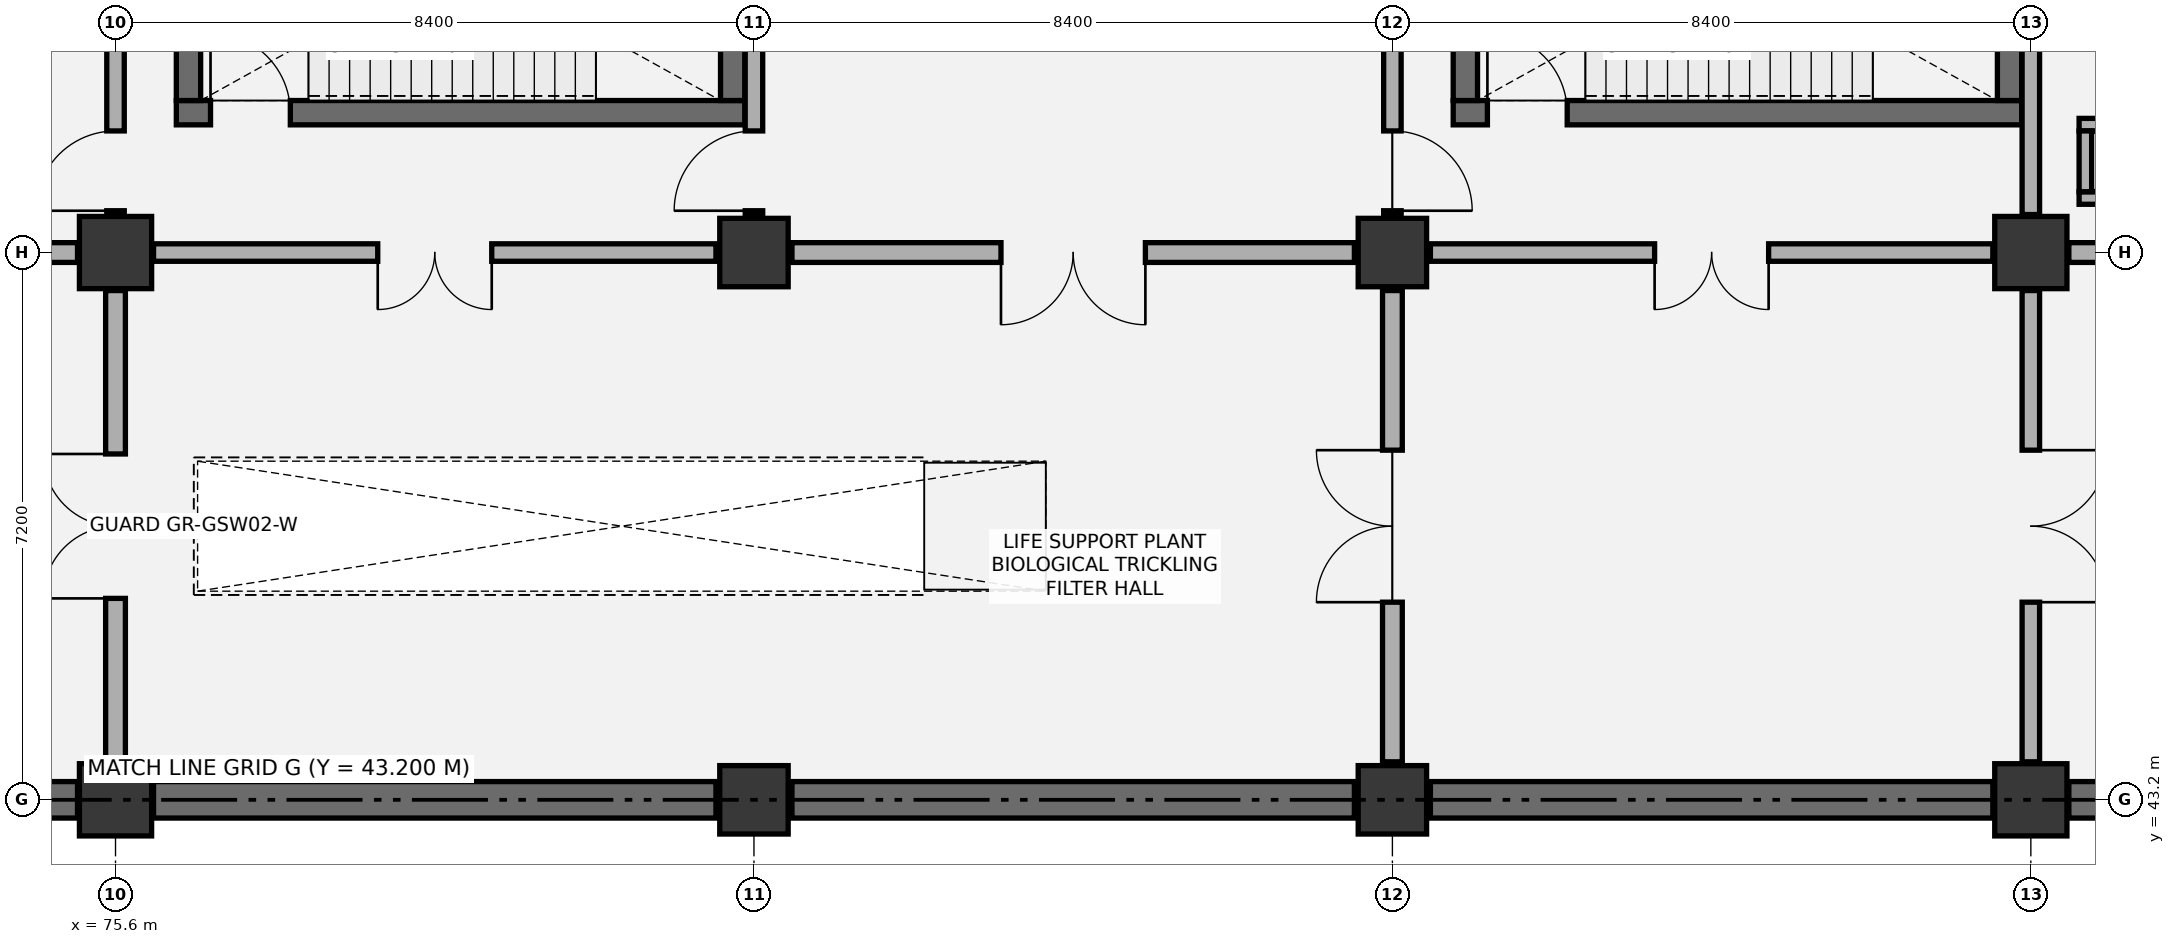
"""IFC4 building model, lengths in metres.
Left out: names, types, materials, properties, quantities, classifications, styles, units other than length and angle.
Written with IfcOpenShell. Run it as: python <this file> out.ifc"""

import sys

from ifc_helpers import new_model, si_unit, direction, frame, frame_2d, origin, origin_2d, place, context, subcontext, project, spatial, rectangle, extrude, element, fill, save


model = new_model("IFC4")
c1 = context("Model", 3, precision=1e-05, world=origin(), true_north=direction((0.0, 1.0)))
c2 = subcontext(c1, "Body", "Model", "MODEL_VIEW")
j1 = project(units=[si_unit("LENGTHUNIT", "METRE"), si_unit("PLANEANGLEUNIT", "RADIAN")], contexts=[c1])
p1 = place(None, origin())
s1 = spatial("IfcSite", under=j1, at=p1, CompositionType="ELEMENT")
p2 = place(p1, origin())
s2 = spatial("IfcBuilding", under=s1, at=p2, CompositionType="ELEMENT")
p3 = place(p2, frame((0.0, 0.0, -4.8)))
s3 = spatial("IfcBuildingStorey", under=s2, at=p3, CompositionType="ELEMENT", Elevation=-4.8)
for number, where, z_axis, x_axis in (
    (1, (75.6, 43.2, 0.0), (0.0, 0.0, 1.0), (1.0, 0.0, 0.0)),
    (2, (75.6, 50.4, 0.0), (0.0, 0.0, 1.0), (1.0, 0.0, 0.0)),
):
    element("IfcColumn", number, at=place(p3, frame(where, z_axis=z_axis, x_axis=x_axis)), inside=s3, PredefinedType="COLUMN", context=c2, shape_type="SweptSolid", body=[
        extrude(rectangle(XDim=0.95, YDim=0.95, at=origin_2d()), origin(), (0.0, 0.0, 1.0), 4.8),
    ])
for number, where, z_axis, x_axis in (
    (3, (84.0, 43.2, 0.0), (0.0, 0.0, 1.0), (1.0, 0.0, 0.0)),
    (4, (84.0, 50.4, 0.0), (0.0, 0.0, 1.0), (1.0, 0.0, 0.0)),
    (5, (92.4, 43.2, 0.0), (0.0, 0.0, 1.0), (1.0, 0.0, 0.0)),
    (6, (92.4, 50.4, 0.0), (0.0, 0.0, 1.0), (1.0, 0.0, 0.0)),
):
    element("IfcColumn", number, at=place(p3, frame(where, z_axis=z_axis, x_axis=x_axis)), inside=s3, PredefinedType="COLUMN", context=c2, shape_type="SweptSolid", body=[
        extrude(rectangle(XDim=0.9, YDim=0.9, at=origin_2d()), origin(), (0.0, 0.0, 1.0), 4.8),
    ])
for number, where, z_axis, x_axis in (
    (7, (100.8, 43.2, 0.0), (0.0, 0.0, 1.0), (1.0, 0.0, 0.0)),
    (8, (100.8, 50.4, 0.0), (0.0, 0.0, 1.0), (1.0, 0.0, 0.0)),
):
    element("IfcColumn", number, at=place(p3, frame(where, z_axis=z_axis, x_axis=x_axis)), inside=s3, PredefinedType="COLUMN", context=c2, shape_type="SweptSolid", body=[
        extrude(rectangle(XDim=0.95, YDim=0.95, at=origin_2d()), origin(), (0.0, 0.0, 1.0), 4.8),
    ])
p4 = place(p3, frame((67.7, 43.2, 0.0), z_axis=(0.0, 0.0, 1.0), x_axis=(1.0, 0.0, 0.0)))
e9 = element("IfcWall", 9, at=p4, inside=s3, PredefinedType="USERDEFINED", context=c2, shape_type="SweptSolid", body=[
    extrude(rectangle(XDim=7.4, YDim=0.48, at=frame_2d((3.7, 0.0))), origin(), (0.0, 0.0, 1.0), 4.45),
])
for number, where, z_axis, x_axis in (
    (10, (76.1, 43.2, 0.0), (0.0, 0.0, 1.0), (1.0, 0.0, 0.0)),
    (11, (84.5, 43.2, 0.0), (0.0, 0.0, 1.0), (1.0, 0.0, 0.0)),
):
    element("IfcWall", number, at=place(p3, frame(where, z_axis=z_axis, x_axis=x_axis)), inside=s3, PredefinedType="USERDEFINED", context=c2, shape_type="SweptSolid", body=[
        extrude(rectangle(XDim=7.4, YDim=0.48, at=frame_2d((3.7, 0.0))), origin(), (0.0, 0.0, 1.0), 4.45),
    ])
p5 = place(p3, frame((92.9, 43.2, 0.0), z_axis=(0.0, 0.0, 1.0), x_axis=(1.0, 0.0, 0.0)))
e12 = element("IfcWall", 12, at=p5, inside=s3, PredefinedType="USERDEFINED", context=c2, shape_type="SweptSolid", body=[
    extrude(rectangle(XDim=7.4, YDim=0.48, at=frame_2d((3.7, 0.0))), origin(), (0.0, 0.0, 1.0), 4.45),
])
p6 = place(p3, frame((101.3, 43.2, 0.0), z_axis=(0.0, 0.0, 1.0), x_axis=(1.0, 0.0, 0.0)))
e13 = element("IfcWall", 13, at=p6, inside=s3, PredefinedType="USERDEFINED", context=c2, shape_type="SweptSolid", body=[
    extrude(rectangle(XDim=7.4, YDim=0.48, at=frame_2d((3.7, 0.0))), origin(), (0.0, 0.0, 1.0), 4.45),
])
p7 = place(p3, frame((76.4, 52.24, 0.0), z_axis=(0.0, 0.0, 1.0), x_axis=(1.0, 0.0, 0.0)))
e14 = element("IfcWall", 14, at=p7, inside=s3, PredefinedType="SHEAR", context=c2, shape_type="SweptSolid", body=[
    extrude(rectangle(XDim=7.48, YDim=0.32, at=frame_2d((3.74, 0.0))), origin(), (0.0, 0.0, 1.0), 4.45),
])
p8 = place(p7, frame((0.45, 0.0, 0.0)))
e15 = element("IfcOpeningElement", 15, at=p8, cuts=e14, PredefinedType="OPENING", context=c2, shape_type="SweptSolid", body=[
    extrude(rectangle(XDim=1.05, YDim=2.15, at=frame_2d((0.525, 1.075))), frame((0.0, 0.17, 0.0), z_axis=(0.0, -1.0, 0.0), x_axis=(1.0, 0.0, 0.0)), (0.0, 0.0, 1.0), 0.34),
])
for number, where, z_axis, x_axis in (
    (16, (76.56, 52.4, 0.0), (0.0, 0.0, 1.0), (0.0, 1.0, 0.0)),
    (17, (83.72, 52.4, 0.0), (0.0, 0.0, 1.0), (0.0, 1.0, 0.0)),
):
    element("IfcWall", number, at=place(p3, frame(where, z_axis=z_axis, x_axis=x_axis)), inside=s3, PredefinedType="SHEAR", context=c2, shape_type="SweptSolid", body=[
        extrude(rectangle(XDim=3.8, YDim=0.32, at=frame_2d((1.9, 0.0))), origin(), (0.0, 0.0, 1.0), 4.45),
    ])
p9 = place(p3, frame((93.2, 52.24, 0.0), z_axis=(0.0, 0.0, 1.0), x_axis=(1.0, 0.0, 0.0)))
e18 = element("IfcWall", 18, at=p9, inside=s3, PredefinedType="SHEAR", context=c2, shape_type="SweptSolid", body=[
    extrude(rectangle(XDim=7.48, YDim=0.32, at=frame_2d((3.74, 0.0))), origin(), (0.0, 0.0, 1.0), 4.45),
])
p10 = place(p9, frame((0.45, 0.0, 0.0)))
e19 = element("IfcOpeningElement", 19, at=p10, cuts=e18, PredefinedType="OPENING", context=c2, shape_type="SweptSolid", body=[
    extrude(rectangle(XDim=1.05, YDim=2.15, at=frame_2d((0.525, 1.075))), frame((0.0, 0.17, 0.0), z_axis=(0.0, -1.0, 0.0), x_axis=(1.0, 0.0, 0.0)), (0.0, 0.0, 1.0), 0.34),
])
for number, where, z_axis, x_axis in (
    (20, (93.36, 52.4, 0.0), (0.0, 0.0, 1.0), (0.0, 1.0, 0.0)),
    (21, (100.52, 52.4, 0.0), (0.0, 0.0, 1.0), (0.0, 1.0, 0.0)),
):
    element("IfcWall", number, at=place(p3, frame(where, z_axis=z_axis, x_axis=x_axis)), inside=s3, PredefinedType="SHEAR", context=c2, shape_type="SweptSolid", body=[
        extrude(rectangle(XDim=3.8, YDim=0.32, at=frame_2d((1.9, 0.0))), origin(), (0.0, 0.0, 1.0), 4.45),
    ])
for number, where, z_axis, x_axis in (
    (22, (101.435, 51.117, 0.0), (0.0, 0.0, 1.0), (1.0, 0.0, 0.0)),
    (23, (101.435, 52.083, 0.0), (0.0, 0.0, 1.0), (1.0, 0.0, 0.0)),
):
    element("IfcWall", number, at=place(p3, frame(where, z_axis=z_axis, x_axis=x_axis)), inside=s3, PredefinedType="PARTITIONING", context=c2, shape_type="SweptSolid", body=[
        extrude(rectangle(XDim=1.43, YDim=0.165, at=frame_2d((0.715, 0.0))), origin(), (0.0, 0.0, 1.0), 4.45),
    ])
p11 = place(p3, frame((101.518, 51.2, 0.0), z_axis=(0.0, 0.0, 1.0), x_axis=(0.0, 1.0, 0.0)))
e24 = element("IfcWall", 24, at=p11, inside=s3, PredefinedType="PARTITIONING", context=c2, shape_type="SweptSolid", body=[
    extrude(rectangle(XDim=0.8, YDim=0.165, at=frame_2d((0.4, 0.0))), origin(), (0.0, 0.0, 1.0), 4.45),
])
p12 = place(p3, frame((75.6, 43.7, 0.0), z_axis=(0.0, 0.0, 1.0), x_axis=(0.0, 1.0, 0.0)))
e25 = element("IfcWall", 25, at=p12, inside=s3, PredefinedType="PARTITIONING", context=c2, shape_type="SweptSolid", body=[
    extrude(rectangle(XDim=6.2, YDim=0.26, at=frame_2d((3.1, 0.0))), origin(), (0.0, 0.0, 1.0), 3.645),
])
p13 = place(p12, frame((2.15, 0.0, 0.0)))
e26 = element("IfcOpeningElement", 26, at=p13, cuts=e25, PredefinedType="OPENING", context=c2, shape_type="SweptSolid", body=[
    extrude(rectangle(XDim=1.9, YDim=2.3, at=frame_2d((0.95, 1.15))), frame((0.0, 0.14, 0.0), z_axis=(0.0, -1.0, 0.0), x_axis=(1.0, 0.0, 0.0)), (0.0, 0.0, 1.0), 0.28),
])
p14 = place(p3, frame((67.7, 50.4, 0.0), z_axis=(0.0, 0.0, 1.0), x_axis=(1.0, 0.0, 0.0)))
e27 = element("IfcWall", 27, at=p14, inside=s3, PredefinedType="PARTITIONING", context=c2, shape_type="SweptSolid", body=[
    extrude(rectangle(XDim=7.4, YDim=0.26, at=frame_2d((3.7, 0.0))), origin(), (0.0, 0.0, 1.0), 3.545),
])
p15 = place(p3, frame((75.6, 50.9, 0.0), z_axis=(0.0, 0.0, 1.0), x_axis=(0.0, 1.0, 0.0)))
e28 = element("IfcWall", 28, at=p15, inside=s3, PredefinedType="PARTITIONING", context=c2, shape_type="SweptSolid", body=[
    extrude(rectangle(XDim=6.2, YDim=0.23, at=frame_2d((3.1, 0.0))), origin(), (0.0, 0.0, 1.0), 3.645),
])
p16 = place(p15, frame((0.05, 0.0, 0.0)))
e29 = element("IfcOpeningElement", 29, at=p16, cuts=e28, PredefinedType="OPENING", context=c2, shape_type="SweptSolid", body=[
    extrude(rectangle(XDim=1.05, YDim=2.15, at=frame_2d((0.525, 1.075))), frame((0.0, 0.125, 0.0), z_axis=(0.0, -1.0, 0.0), x_axis=(1.0, 0.0, 0.0)), (0.0, 0.0, 1.0), 0.25),
])
p17 = place(p3, frame((76.1, 50.4, 0.0), z_axis=(0.0, 0.0, 1.0), x_axis=(1.0, 0.0, 0.0)))
e30 = element("IfcWall", 30, at=p17, inside=s3, PredefinedType="PARTITIONING", context=c2, shape_type="SweptSolid", body=[
    extrude(rectangle(XDim=7.4, YDim=0.23, at=frame_2d((3.7, 0.0))), origin(), (0.0, 0.0, 1.0), 3.545),
])
p18 = place(p17, frame((2.95, 0.0, 0.0)))
e31 = element("IfcOpeningElement", 31, at=p18, cuts=e30, PredefinedType="OPENING", context=c2, shape_type="SweptSolid", body=[
    extrude(rectangle(XDim=1.5, YDim=2.15, at=frame_2d((0.75, 1.075))), frame((0.0, 0.125, 0.0), z_axis=(0.0, -1.0, 0.0), x_axis=(1.0, 0.0, 0.0)), (0.0, 0.0, 1.0), 0.25),
])
p19 = place(p3, frame((84.0, 50.9, 0.0), z_axis=(0.0, 0.0, 1.0), x_axis=(0.0, 1.0, 0.0)))
e32 = element("IfcWall", 32, at=p19, inside=s3, PredefinedType="PARTITIONING", context=c2, shape_type="SweptSolid", body=[
    extrude(rectangle(XDim=6.2, YDim=0.23, at=frame_2d((3.1, 0.0))), origin(), (0.0, 0.0, 1.0), 3.645),
])
p20 = place(p19, frame((0.05, 0.0, 0.0)))
e33 = element("IfcOpeningElement", 33, at=p20, cuts=e32, PredefinedType="OPENING", context=c2, shape_type="SweptSolid", body=[
    extrude(rectangle(XDim=1.05, YDim=2.15, at=frame_2d((0.525, 1.075))), frame((0.0, 0.125, 0.0), z_axis=(0.0, -1.0, 0.0), x_axis=(1.0, 0.0, 0.0)), (0.0, 0.0, 1.0), 0.25),
])
p21 = place(p3, frame((92.4, 43.7, 0.0), z_axis=(0.0, 0.0, 1.0), x_axis=(0.0, 1.0, 0.0)))
e34 = element("IfcWall", 34, at=p21, inside=s3, PredefinedType="PARTITIONING", context=c2, shape_type="SweptSolid", body=[
    extrude(rectangle(XDim=6.2, YDim=0.26, at=frame_2d((3.1, 0.0))), origin(), (0.0, 0.0, 1.0), 3.645),
])
p22 = place(p21, frame((2.1, 0.0, 0.0)))
e35 = element("IfcOpeningElement", 35, at=p22, cuts=e34, PredefinedType="OPENING", context=c2, shape_type="SweptSolid", body=[
    extrude(rectangle(XDim=2.0, YDim=2.35, at=frame_2d((1.0, 1.175))), frame((0.0, 0.14, 0.0), z_axis=(0.0, -1.0, 0.0), x_axis=(1.0, 0.0, 0.0)), (0.0, 0.0, 1.0), 0.28),
])
p23 = place(p3, frame((84.5, 50.4, 0.0), z_axis=(0.0, 0.0, 1.0), x_axis=(1.0, 0.0, 0.0)))
e36 = element("IfcWall", 36, at=p23, inside=s3, PredefinedType="PARTITIONING", context=c2, shape_type="SweptSolid", body=[
    extrude(rectangle(XDim=7.4, YDim=0.26, at=frame_2d((3.7, 0.0))), origin(), (0.0, 0.0, 1.0), 3.545),
])
p24 = place(p23, frame((2.75, 0.0, 0.0)))
e37 = element("IfcOpeningElement", 37, at=p24, cuts=e36, PredefinedType="OPENING", context=c2, shape_type="SweptSolid", body=[
    extrude(rectangle(XDim=1.9, YDim=2.3, at=frame_2d((0.95, 1.15))), frame((0.0, 0.14, 0.0), z_axis=(0.0, -1.0, 0.0), x_axis=(1.0, 0.0, 0.0)), (0.0, 0.0, 1.0), 0.28),
])
p25 = place(p3, frame((92.4, 50.9, 0.0), z_axis=(0.0, 0.0, 1.0), x_axis=(0.0, 1.0, 0.0)))
e38 = element("IfcWall", 38, at=p25, inside=s3, PredefinedType="PARTITIONING", context=c2, shape_type="SweptSolid", body=[
    extrude(rectangle(XDim=6.2, YDim=0.23, at=frame_2d((3.1, 0.0))), origin(), (0.0, 0.0, 1.0), 3.645),
])
p26 = place(p25, frame((0.05, 0.0, 0.0)))
e39 = element("IfcOpeningElement", 39, at=p26, cuts=e38, PredefinedType="OPENING", context=c2, shape_type="SweptSolid", body=[
    extrude(rectangle(XDim=1.05, YDim=2.15, at=frame_2d((0.525, 1.075))), frame((0.0, 0.125, 0.0), z_axis=(0.0, -1.0, 0.0), x_axis=(1.0, 0.0, 0.0)), (0.0, 0.0, 1.0), 0.25),
])
p27 = place(p3, frame((100.8, 43.7, 0.0), z_axis=(0.0, 0.0, 1.0), x_axis=(0.0, 1.0, 0.0)))
e40 = element("IfcWall", 40, at=p27, inside=s3, PredefinedType="PARTITIONING", context=c2, shape_type="SweptSolid", body=[
    extrude(rectangle(XDim=6.2, YDim=0.23, at=frame_2d((3.1, 0.0))), origin(), (0.0, 0.0, 1.0), 3.645),
])
p28 = place(p27, frame((2.1, 0.0, 0.0)))
e41 = element("IfcOpeningElement", 41, at=p28, cuts=e40, PredefinedType="OPENING", context=c2, shape_type="SweptSolid", body=[
    extrude(rectangle(XDim=2.0, YDim=2.35, at=frame_2d((1.0, 1.175))), frame((0.0, 0.125, 0.0), z_axis=(0.0, -1.0, 0.0), x_axis=(1.0, 0.0, 0.0)), (0.0, 0.0, 1.0), 0.25),
])
p29 = place(p3, frame((92.9, 50.4, 0.0), z_axis=(0.0, 0.0, 1.0), x_axis=(1.0, 0.0, 0.0)))
e42 = element("IfcWall", 42, at=p29, inside=s3, PredefinedType="PARTITIONING", context=c2, shape_type="SweptSolid", body=[
    extrude(rectangle(XDim=7.4, YDim=0.23, at=frame_2d((3.7, 0.0))), origin(), (0.0, 0.0, 1.0), 3.545),
])
p30 = place(p29, frame((2.95, 0.0, 0.0)))
e43 = element("IfcOpeningElement", 43, at=p30, cuts=e42, PredefinedType="OPENING", context=c2, shape_type="SweptSolid", body=[
    extrude(rectangle(XDim=1.5, YDim=2.15, at=frame_2d((0.75, 1.075))), frame((0.0, 0.125, 0.0), z_axis=(0.0, -1.0, 0.0), x_axis=(1.0, 0.0, 0.0)), (0.0, 0.0, 1.0), 0.25),
])
p31 = place(p3, frame((100.8, 50.9, 0.0), z_axis=(0.0, 0.0, 1.0), x_axis=(0.0, 1.0, 0.0)))
e44 = element("IfcWall", 44, at=p31, inside=s3, PredefinedType="PARTITIONING", context=c2, shape_type="SweptSolid", body=[
    extrude(rectangle(XDim=6.2, YDim=0.23, at=frame_2d((3.1, 0.0))), origin(), (0.0, 0.0, 1.0), 3.645),
])
p32 = place(p3, frame((101.3, 50.4, 0.0), z_axis=(0.0, 0.0, 1.0), x_axis=(1.0, 0.0, 0.0)))
e45 = element("IfcWall", 45, at=p32, inside=s3, PredefinedType="PARTITIONING", context=c2, shape_type="SweptSolid", body=[
    extrude(rectangle(XDim=7.4, YDim=0.26, at=frame_2d((3.7, 0.0))), origin(), (0.0, 0.0, 1.0), 3.545),
])
p33 = place(p32, frame((2.75, 0.0, 0.0)))
e46 = element("IfcOpeningElement", 46, at=p33, cuts=e45, PredefinedType="OPENING", context=c2, shape_type="SweptSolid", body=[
    extrude(rectangle(XDim=1.9, YDim=2.3, at=frame_2d((0.95, 1.15))), frame((0.0, 0.14, 0.0), z_axis=(0.0, -1.0, 0.0), x_axis=(1.0, 0.0, 0.0)), (0.0, 0.0, 1.0), 0.28),
])
p34 = place(p8, origin())
e47 = element("IfcDoor", 47, at=p34, inside=s3, OperationType="SINGLE_SWING_LEFT", PredefinedType="DOOR", context=c2, shape_type="SweptSolid", body=[
    extrude(rectangle(XDim=1.05, YDim=2.15, at=frame_2d((0.525, 1.075))), frame((0.0, 0.025, 0.0), z_axis=(0.0, -1.0, 0.0), x_axis=(1.0, 0.0, 0.0)), (0.0, 0.0, 1.0), 0.05),
])
fill(e15, e47)
p35 = place(p10, origin())
e48 = element("IfcDoor", 48, at=p35, inside=s3, OperationType="SINGLE_SWING_LEFT", PredefinedType="DOOR", context=c2, shape_type="SweptSolid", body=[
    extrude(rectangle(XDim=1.05, YDim=2.15, at=frame_2d((0.525, 1.075))), frame((0.0, 0.025, 0.0), z_axis=(0.0, -1.0, 0.0), x_axis=(1.0, 0.0, 0.0)), (0.0, 0.0, 1.0), 0.05),
])
fill(e19, e48)
p36 = place(p13, origin())
e49 = element("IfcDoor", 49, at=p36, inside=s3, OperationType="DOUBLE_DOOR_SINGLE_SWING", PredefinedType="DOOR", context=c2, shape_type="SweptSolid", body=[
    extrude(rectangle(XDim=1.9, YDim=2.3, at=frame_2d((0.95, 1.15))), frame((0.0, 0.025, 0.0), z_axis=(0.0, -1.0, 0.0), x_axis=(1.0, 0.0, 0.0)), (0.0, 0.0, 1.0), 0.05),
])
fill(e26, e49)
p37 = place(p16, origin())
e50 = element("IfcDoor", 50, at=p37, inside=s3, OperationType="SINGLE_SWING_LEFT", PredefinedType="DOOR", context=c2, shape_type="SweptSolid", body=[
    extrude(rectangle(XDim=1.05, YDim=2.15, at=frame_2d((0.525, 1.075))), frame((0.0, 0.025, 0.0), z_axis=(0.0, -1.0, 0.0), x_axis=(1.0, 0.0, 0.0)), (0.0, 0.0, 1.0), 0.05),
])
fill(e29, e50)
p38 = place(p18, frame((1.5, 0.0, 0.0), z_axis=(0.0, 0.0, 1.0), x_axis=(-1.0, 0.0, 0.0)))
e51 = element("IfcDoor", 51, at=p38, inside=s3, OperationType="DOUBLE_DOOR_SINGLE_SWING", PredefinedType="DOOR", context=c2, shape_type="SweptSolid", body=[
    extrude(rectangle(XDim=1.5, YDim=2.15, at=frame_2d((0.75, 1.075))), frame((0.0, 0.025, 0.0), z_axis=(0.0, -1.0, 0.0), x_axis=(1.0, 0.0, 0.0)), (0.0, 0.0, 1.0), 0.05),
])
fill(e31, e51)
p39 = place(p20, origin())
e52 = element("IfcDoor", 52, at=p39, inside=s3, OperationType="SINGLE_SWING_LEFT", PredefinedType="DOOR", context=c2, shape_type="SweptSolid", body=[
    extrude(rectangle(XDim=1.05, YDim=2.15, at=frame_2d((0.525, 1.075))), frame((0.0, 0.025, 0.0), z_axis=(0.0, -1.0, 0.0), x_axis=(1.0, 0.0, 0.0)), (0.0, 0.0, 1.0), 0.05),
])
fill(e33, e52)
p40 = place(p22, origin())
e53 = element("IfcDoor", 53, at=p40, inside=s3, OperationType="DOUBLE_DOOR_SINGLE_SWING", PredefinedType="DOOR", context=c2, shape_type="SweptSolid", body=[
    extrude(rectangle(XDim=2.0, YDim=2.35, at=frame_2d((1.0, 1.175))), frame((0.0, 0.025, 0.0), z_axis=(0.0, -1.0, 0.0), x_axis=(1.0, 0.0, 0.0)), (0.0, 0.0, 1.0), 0.05),
])
fill(e35, e53)
p41 = place(p24, frame((1.9, 0.0, 0.0), z_axis=(0.0, 0.0, 1.0), x_axis=(-1.0, 0.0, 0.0)))
e54 = element("IfcDoor", 54, at=p41, inside=s3, OperationType="DOUBLE_DOOR_SINGLE_SWING", PredefinedType="DOOR", context=c2, shape_type="SweptSolid", body=[
    extrude(rectangle(XDim=1.9, YDim=2.3, at=frame_2d((0.95, 1.15))), frame((0.0, 0.025, 0.0), z_axis=(0.0, -1.0, 0.0), x_axis=(1.0, 0.0, 0.0)), (0.0, 0.0, 1.0), 0.05),
])
fill(e37, e54)
p42 = place(p26, frame((1.05, 0.0, 0.0), z_axis=(0.0, 0.0, 1.0), x_axis=(-1.0, 0.0, 0.0)))
e55 = element("IfcDoor", 55, at=p42, inside=s3, OperationType="SINGLE_SWING_RIGHT", PredefinedType="DOOR", context=c2, shape_type="SweptSolid", body=[
    extrude(rectangle(XDim=1.05, YDim=2.15, at=frame_2d((0.525, 1.075))), frame((0.0, 0.025, 0.0), z_axis=(0.0, -1.0, 0.0), x_axis=(1.0, 0.0, 0.0)), (0.0, 0.0, 1.0), 0.05),
])
fill(e39, e55)
p43 = place(p28, frame((2.0, 0.0, 0.0), z_axis=(0.0, 0.0, 1.0), x_axis=(-1.0, 0.0, 0.0)))
e56 = element("IfcDoor", 56, at=p43, inside=s3, OperationType="DOUBLE_DOOR_SINGLE_SWING", PredefinedType="DOOR", context=c2, shape_type="SweptSolid", body=[
    extrude(rectangle(XDim=2.0, YDim=2.35, at=frame_2d((1.0, 1.175))), frame((0.0, 0.025, 0.0), z_axis=(0.0, -1.0, 0.0), x_axis=(1.0, 0.0, 0.0)), (0.0, 0.0, 1.0), 0.05),
])
fill(e41, e56)
p44 = place(p30, frame((1.5, 0.0, 0.0), z_axis=(0.0, 0.0, 1.0), x_axis=(-1.0, 0.0, 0.0)))
e57 = element("IfcDoor", 57, at=p44, inside=s3, OperationType="DOUBLE_DOOR_SINGLE_SWING", PredefinedType="DOOR", context=c2, shape_type="SweptSolid", body=[
    extrude(rectangle(XDim=1.5, YDim=2.15, at=frame_2d((0.75, 1.075))), frame((0.0, 0.025, 0.0), z_axis=(0.0, -1.0, 0.0), x_axis=(1.0, 0.0, 0.0)), (0.0, 0.0, 1.0), 0.05),
])
fill(e43, e57)
save(model, sys.argv[1])
